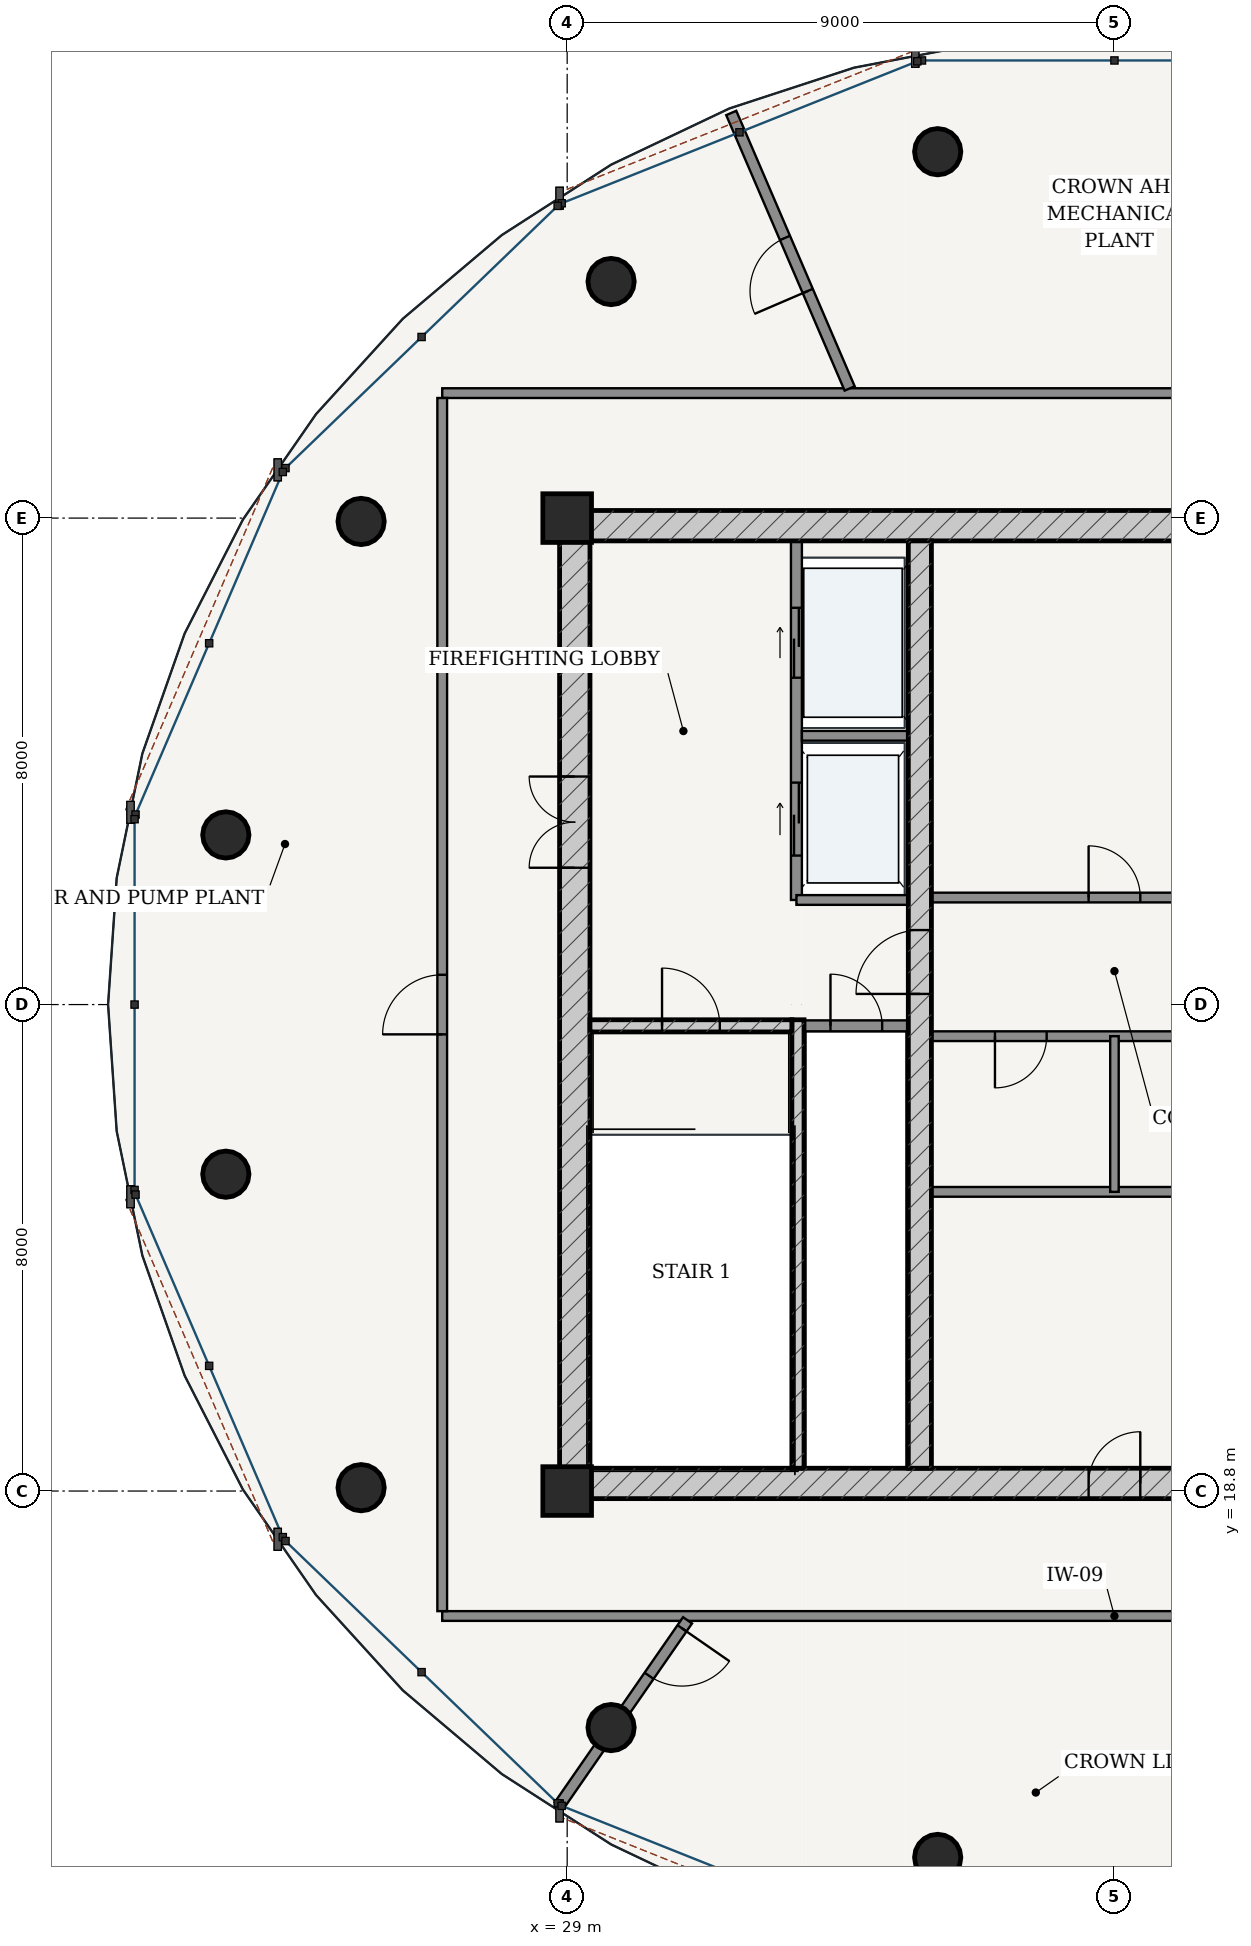
"""IFC4 building model, lengths in metres.
Left out: names, types, materials, properties, quantities, classifications, styles, units other than length and angle.
Written with IfcOpenShell. Run it as: python <this file> out.ifc"""

import sys

from ifc_helpers import new_model, si_unit, direction, frame, frame_2d, origin, origin_2d, place, context, subcontext, project, spatial, rectangle, hollow_circle, extrude, source, transform, mapped, element, fill, save


model = new_model("IFC4")
c1 = context("Model", 3, precision=1e-05, world=origin(), true_north=direction((-0.2419218956, 0.970295726276)))
c2 = subcontext(c1, "Body", "Model", "MODEL_VIEW")
j1 = project(units=[si_unit("LENGTHUNIT", "METRE"), si_unit("PLANEANGLEUNIT", "RADIAN")], contexts=[c1])
p1 = place(None, origin())
s1 = spatial("IfcSite", under=j1, at=p1, CompositionType="ELEMENT")
p2 = place(p1, origin())
s2 = spatial("IfcBuilding", under=s1, at=p2, CompositionType="ELEMENT")
p3 = place(p2, frame((0.0, 0.0, 332.1)))
s3 = spatial("IfcBuildingStorey", under=s2, at=p3, CompositionType="ELEMENT", Elevation=332.1)
for number, where, z_axis, x_axis in (
    (1, (29.0, 18.8, 0.0), (0.0, 0.0, 1.0), (1.0, 0.0, 0.0)),
    (2, (29.0, 34.8, 0.0), (0.0, 0.0, 1.0), (1.0, 0.0, 0.0)),
):
    element("IfcColumn", number, at=place(p3, frame(where, z_axis=z_axis, x_axis=x_axis)), inside=s3, PredefinedType="COLUMN", context=c2, shape_type="SweptSolid", body=[
        extrude(rectangle(XDim=0.8, YDim=0.8, at=origin_2d()), origin(), (0.0, 0.0, 1.0), 5.2),
    ])
p4 = place(p3, frame((28.875, 18.925, 0.0), z_axis=(0.0, 0.0, 1.0), x_axis=(1.0, 0.0, 0.0)))
e3 = element("IfcWall", 3, at=p4, inside=s3, PredefinedType="SHEAR", context=c2, shape_type="SweptSolid", body=[
    extrude(rectangle(XDim=18.25, YDim=0.5, at=frame_2d((9.125, 0.0))), origin(), (0.0, 0.0, 1.0), 4.85),
])
p5 = place(p4, frame((8.7, 0.0, 0.0)))
e4 = element("IfcOpeningElement", 4, at=p5, cuts=e3, PredefinedType="OPENING", context=c2, shape_type="SweptSolid", body=[
    extrude(rectangle(XDim=0.85, YDim=2.1, at=frame_2d((0.425, 1.05))), frame((0.0, 0.26, 0.0), z_axis=(0.0, -1.0, 0.0), x_axis=(1.0, 0.0, 0.0)), (0.0, 0.0, 1.0), 0.52),
])
p6 = place(p3, frame((28.875, 34.675, 0.0), z_axis=(0.0, 0.0, 1.0), x_axis=(1.0, 0.0, 0.0)))
e5 = element("IfcWall", 5, at=p6, inside=s3, PredefinedType="SHEAR", context=c2, shape_type="SweptSolid", body=[
    extrude(rectangle(XDim=18.25, YDim=0.5, at=frame_2d((9.125, 0.0))), origin(), (0.0, 0.0, 1.0), 4.85),
])
p7 = place(p3, frame((29.125, 19.175, 0.0), z_axis=(0.0, 0.0, 1.0), x_axis=(0.0, 1.0, 0.0)))
e6 = element("IfcWall", 6, at=p7, inside=s3, PredefinedType="SHEAR", context=c2, shape_type="SweptSolid", body=[
    extrude(rectangle(XDim=15.25, YDim=0.5, at=frame_2d((7.625, 0.0))), origin(), (0.0, 0.0, 1.0), 4.85),
])
p8 = place(p7, frame((9.875, 0.0, 0.0)))
e7 = element("IfcOpeningElement", 7, at=p8, cuts=e6, PredefinedType="OPENING", context=c2, shape_type="SweptSolid", body=[
    extrude(rectangle(XDim=1.5, YDim=2.2, at=frame_2d((0.75, 1.1))), frame((0.0, 0.26, 0.0), z_axis=(0.0, -1.0, 0.0), x_axis=(1.0, 0.0, 0.0)), (0.0, 0.0, 1.0), 0.52),
])
p9 = place(p3, frame((32.795, 19.175, 0.0), z_axis=(0.0, 0.0, 1.0), x_axis=(0.0, 1.0, 0.0)))
e8 = element("IfcWall", 8, at=p9, inside=s3, PredefinedType="SOLIDWALL", context=c2, shape_type="SweptSolid", body=[
    extrude(rectangle(XDim=7.375, YDim=0.2, at=frame_2d((3.688, 0.0))), origin(), (0.0, 0.0, 1.0), 4.85),
])
p10 = place(p3, frame((29.375, 26.45, 0.0), z_axis=(0.0, 0.0, 1.0), x_axis=(1.0, 0.0, 0.0)))
e9 = element("IfcWall", 9, at=p10, inside=s3, PredefinedType="SOLIDWALL", context=c2, shape_type="SweptSolid", body=[
    extrude(rectangle(XDim=3.32, YDim=0.2, at=frame_2d((1.66, 0.0))), origin(), (0.0, 0.0, 1.0), 4.85),
])
p11 = place(p10, frame((1.185, 0.0, 0.0)))
e10 = element("IfcOpeningElement", 10, at=p11, cuts=e9, PredefinedType="OPENING", context=c2, shape_type="SweptSolid", body=[
    extrude(rectangle(XDim=0.95, YDim=2.15, at=frame_2d((0.475, 1.075))), frame((0.0, 0.11, 0.0), z_axis=(0.0, -1.0, 0.0), x_axis=(1.0, 0.0, 0.0)), (0.0, 0.0, 1.0), 0.22),
])
p12 = place(p3, frame((34.8, 19.175, 0.0), z_axis=(0.0, 0.0, 1.0), x_axis=(0.0, 1.0, 0.0)))
e11 = element("IfcWall", 11, at=p12, inside=s3, PredefinedType="SHEAR", context=c2, shape_type="SweptSolid", body=[
    extrude(rectangle(XDim=15.25, YDim=0.38, at=frame_2d((7.625, 0.0))), origin(), (0.0, 0.0, 1.0), 4.85),
])
p13 = place(p12, frame((7.8, 0.0, 0.0)))
e12 = element("IfcOpeningElement", 12, at=p13, cuts=e11, PredefinedType="OPENING", context=c2, shape_type="SweptSolid", body=[
    extrude(rectangle(XDim=1.05, YDim=2.15, at=frame_2d((0.525, 1.075))), frame((0.0, 0.2, 0.0), z_axis=(0.0, -1.0, 0.0), x_axis=(1.0, 0.0, 0.0)), (0.0, 0.0, 1.0), 0.4),
])
for number, where, z_axis, x_axis in (
    (13, (35.093, 40.825, 0.0), (0.0, 0.0, 1.0), (1.0, 0.0, 0.0)),
    (14, (29.722, 38.69, 0.0), (0.0, 0.0, 1.0), (1.0, 0.0, 0.0)),
    (15, (25.611, 34.745, 0.0), (0.0, 0.0, 1.0), (1.0, 0.0, 0.0)),
    (16, (23.386, 29.59, 0.0), (0.0, 0.0, 1.0), (1.0, 0.0, 0.0)),
    (17, (23.386, 24.01, 0.0), (0.0, 0.0, 1.0), (1.0, 0.0, 0.0)),
    (18, (25.611, 18.855, 0.0), (0.0, 0.0, 1.0), (1.0, 0.0, 0.0)),
    (19, (29.722, 14.91, 0.0), (0.0, 0.0, 1.0), (1.0, 0.0, 0.0)),
    (20, (35.093, 12.775, 0.0), (0.0, 0.0, 1.0), (1.0, 0.0, 0.0)),
):
    element("IfcColumn", number, at=place(p3, frame(where, z_axis=z_axis, x_axis=x_axis)), inside=s3, PredefinedType="COLUMN", context=c2, shape_type="SweptSolid", body=[
        extrude(hollow_circle(Radius=0.381, WallThickness=0.028, at=origin_2d()), origin(), (0.0, 0.0, 1.0), 5.2),
    ])
p14 = place(p3, frame((32.9, 26.45, 0.0), z_axis=(0.0, 0.0, 1.0), x_axis=(1.0, 0.0, 0.0)))
e21 = element("IfcWall", 21, at=p14, inside=s3, PredefinedType="PARTITIONING", context=c2, shape_type="SweptSolid", body=[
    extrude(rectangle(XDim=1.71, YDim=0.18, at=frame_2d((0.855, 0.0))), origin(), (0.0, 0.0, 1.0), 4.85),
])
p15 = place(p14, frame((0.43, 0.0, 0.0)))
e22 = element("IfcOpeningElement", 22, at=p15, cuts=e21, PredefinedType="OPENING", context=c2, shape_type="SweptSolid", body=[
    extrude(rectangle(XDim=0.85, YDim=2.1, at=frame_2d((0.425, 1.05))), frame((0.0, 0.1, 0.0), z_axis=(0.0, -1.0, 0.0), x_axis=(1.0, 0.0, 0.0)), (0.0, 0.0, 1.0), 0.2),
])
p16 = place(p3, frame((32.77, 28.52, 0.0), z_axis=(0.0, 0.0, 1.0), x_axis=(0.0, 1.0, 0.0)))
e23 = element("IfcWall", 23, at=p16, inside=s3, PredefinedType="PARTITIONING", context=c2, shape_type="SweptSolid", body=[
    extrude(rectangle(XDim=5.905, YDim=0.18, at=frame_2d((2.953, 0.0))), origin(), (0.0, 0.0, 1.0), 4.85),
])
p17 = place(p16, frame((3.655, 0.0, 0.0)))
e24 = element("IfcOpeningElement", 24, at=p17, cuts=e23, PredefinedType="OPENING", context=c2, shape_type="SweptSolid", body=[
    extrude(rectangle(XDim=1.15, YDim=2.2, at=frame_2d((0.575, 1.1))), frame((0.0, 0.1, 0.0), z_axis=(0.0, -1.0, 0.0), x_axis=(1.0, 0.0, 0.0)), (0.0, 0.0, 1.0), 0.2),
])
p18 = place(p16, frame((0.73, 0.0, 0.0)))
e25 = element("IfcOpeningElement", 25, at=p18, cuts=e23, PredefinedType="OPENING", context=c2, shape_type="SweptSolid", body=[
    extrude(rectangle(XDim=1.2, YDim=2.25, at=frame_2d((0.6, 1.125))), frame((0.0, 0.1, 0.0), z_axis=(0.0, -1.0, 0.0), x_axis=(1.0, 0.0, 0.0)), (0.0, 0.0, 1.0), 0.2),
])
p19 = place(p3, frame((32.86, 31.22, 0.0), z_axis=(0.0, 0.0, 1.0), x_axis=(1.0, 0.0, 0.0)))
e26 = element("IfcWall", 26, at=p19, inside=s3, PredefinedType="PARTITIONING", context=c2, shape_type="SweptSolid", body=[
    extrude(rectangle(XDim=1.75, YDim=0.16, at=frame_2d((0.875, 0.0))), origin(), (0.0, 0.0, 1.0), 4.85),
])
p20 = place(p3, frame((32.77, 28.52, 0.0), z_axis=(0.0, 0.0, 1.0), x_axis=(1.0, 0.0, 0.0)))
e27 = element("IfcWall", 27, at=p20, inside=s3, PredefinedType="PARTITIONING", context=c2, shape_type="SweptSolid", body=[
    extrude(rectangle(XDim=1.84, YDim=0.16, at=frame_2d((0.92, 0.0))), origin(), (0.0, 0.0, 1.0), 4.85),
])
p21 = place(p3, frame((34.99, 28.56, 0.0), z_axis=(0.0, 0.0, 1.0), x_axis=(1.0, 0.0, 0.0)))
e28 = element("IfcWall", 28, at=p21, inside=s3, PredefinedType="PARTITIONING", context=c2, shape_type="SweptSolid", body=[
    extrude(rectangle(XDim=6.02, YDim=0.16, at=frame_2d((3.01, 0.0))), origin(), (0.0, 0.0, 1.0), 4.85),
])
p22 = place(p21, frame((2.585, 0.0, 0.0)))
e29 = element("IfcOpeningElement", 29, at=p22, cuts=e28, PredefinedType="OPENING", context=c2, shape_type="SweptSolid", body=[
    extrude(rectangle(XDim=0.85, YDim=2.1, at=frame_2d((0.425, 1.05))), frame((0.0, 0.09, 0.0), z_axis=(0.0, -1.0, 0.0), x_axis=(1.0, 0.0, 0.0)), (0.0, 0.0, 1.0), 0.18),
])
p23 = place(p3, frame((34.99, 26.28, 0.0), z_axis=(0.0, 0.0, 1.0), x_axis=(1.0, 0.0, 0.0)))
e30 = element("IfcWall", 30, at=p23, inside=s3, PredefinedType="PARTITIONING", context=c2, shape_type="SweptSolid", body=[
    extrude(rectangle(XDim=6.02, YDim=0.16, at=frame_2d((3.01, 0.0))), origin(), (0.0, 0.0, 1.0), 4.85),
])
p24 = place(p23, frame((1.045, 0.0, 0.0)))
e31 = element("IfcOpeningElement", 31, at=p24, cuts=e30, PredefinedType="OPENING", context=c2, shape_type="SweptSolid", body=[
    extrude(rectangle(XDim=0.85, YDim=2.1, at=frame_2d((0.425, 1.05))), frame((0.0, 0.09, 0.0), z_axis=(0.0, -1.0, 0.0), x_axis=(1.0, 0.0, 0.0)), (0.0, 0.0, 1.0), 0.18),
])
p25 = place(p23, frame((4.125, 0.0, 0.0)))
e32 = element("IfcOpeningElement", 32, at=p25, cuts=e30, PredefinedType="OPENING", context=c2, shape_type="SweptSolid", body=[
    extrude(rectangle(XDim=0.85, YDim=2.1, at=frame_2d((0.425, 1.05))), frame((0.0, 0.09, 0.0), z_axis=(0.0, -1.0, 0.0), x_axis=(1.0, 0.0, 0.0)), (0.0, 0.0, 1.0), 0.18),
])
p26 = place(p3, frame((34.99, 23.72, 0.0), z_axis=(0.0, 0.0, 1.0), x_axis=(1.0, 0.0, 0.0)))
e33 = element("IfcWall", 33, at=p26, inside=s3, PredefinedType="PARTITIONING", context=c2, shape_type="SweptSolid", body=[
    extrude(rectangle(XDim=6.02, YDim=0.16, at=frame_2d((3.01, 0.0))), origin(), (0.0, 0.0, 1.0), 4.85),
])
p27 = place(p3, frame((38.0, 23.72, 0.0), z_axis=(0.0, 0.0, 1.0), x_axis=(0.0, 1.0, 0.0)))
e34 = element("IfcWall", 34, at=p27, inside=s3, PredefinedType="PARTITIONING", context=c2, shape_type="SweptSolid", body=[
    extrude(rectangle(XDim=2.56, YDim=0.14, at=frame_2d((1.28, 0.0))), origin(), (0.0, 0.0, 1.0), 4.85),
])
p28 = place(p3, frame((26.945, 16.745, 0.0), z_axis=(0.0, 0.0, 1.0), x_axis=(1.0, 0.0, 0.0)))
e35 = element("IfcWall", 35, at=p28, inside=s3, PredefinedType="PARTITIONING", context=c2, shape_type="SweptSolid", body=[
    extrude(rectangle(XDim=22.11, YDim=0.16, at=frame_2d((11.055, 0.0))), origin(), (0.0, 0.0, 1.0), 4.422),
])
p29 = place(p28, frame((12.424, 0.0, 0.0)))
e36 = element("IfcOpeningElement", 36, at=p29, cuts=e35, PredefinedType="OPENING", context=c2, shape_type="SweptSolid", body=[
    extrude(rectangle(XDim=0.98, YDim=2.2, at=frame_2d((0.49, 1.1))), frame((0.0, 0.09, 0.0), z_axis=(0.0, -1.0, 0.0), x_axis=(1.0, 0.0, 0.0)), (0.0, 0.0, 1.0), 0.18),
])
p30 = place(p3, frame((26.945, 36.855, 0.0), z_axis=(0.0, 0.0, 1.0), x_axis=(1.0, 0.0, 0.0)))
e37 = element("IfcWall", 37, at=p30, inside=s3, PredefinedType="PARTITIONING", context=c2, shape_type="SweptSolid", body=[
    extrude(rectangle(XDim=22.11, YDim=0.16, at=frame_2d((11.055, 0.0))), origin(), (0.0, 0.0, 1.0), 4.422),
])
p31 = place(p30, frame((13.768, 0.0, 0.0)))
e38 = element("IfcOpeningElement", 38, at=p31, cuts=e37, PredefinedType="OPENING", context=c2, shape_type="SweptSolid", body=[
    extrude(rectangle(XDim=0.98, YDim=2.2, at=frame_2d((0.49, 1.1))), frame((0.0, 0.09, 0.0), z_axis=(0.0, -1.0, 0.0), x_axis=(1.0, 0.0, 0.0)), (0.0, 0.0, 1.0), 0.18),
])
p32 = place(p3, frame((26.945, 16.825, 0.0), z_axis=(0.0, 0.0, 1.0), x_axis=(0.0, 1.0, 0.0)))
e39 = element("IfcWall", 39, at=p32, inside=s3, PredefinedType="PARTITIONING", context=c2, shape_type="SweptSolid", body=[
    extrude(rectangle(XDim=19.95, YDim=0.16, at=frame_2d((9.975, 0.0))), origin(), (0.0, 0.0, 1.0), 4.422),
])
p33 = place(p32, frame((9.485, 0.0, 0.0)))
e40 = element("IfcOpeningElement", 40, at=p33, cuts=e39, PredefinedType="OPENING", context=c2, shape_type="SweptSolid", body=[
    extrude(rectangle(XDim=0.98, YDim=2.2, at=frame_2d((0.49, 1.1))), frame((0.0, 0.09, 0.0), z_axis=(0.0, -1.0, 0.0), x_axis=(1.0, 0.0, 0.0)), (0.0, 0.0, 1.0), 0.18),
])
p34 = place(p3, frame((33.645, 36.932, 0.0), z_axis=(0.0, 0.0, 1.0), x_axis=(-0.394839297391, 0.918750199584, 0.0)))
e41 = element("IfcWall", 41, at=p34, inside=s3, PredefinedType="PARTITIONING", context=c2, shape_type="SweptSolid", body=[
    extrude(rectangle(XDim=4.931, YDim=0.18, at=frame_2d((2.466, 0.0))), origin(), (0.0, 0.0, 1.0), 4.481),
])
p35 = place(p34, frame((1.744, 0.0, 0.0)))
e42 = element("IfcOpeningElement", 42, at=p35, cuts=e41, PredefinedType="OPENING", context=c2, shape_type="SweptSolid", body=[
    extrude(rectangle(XDim=0.95, YDim=2.15, at=frame_2d((0.475, 1.075))), frame((0.0, 0.1, 0.0), z_axis=(0.0, -1.0, 0.0), x_axis=(1.0, 0.0, 0.0)), (0.0, 0.0, 1.0), 0.2),
])
p36 = place(p3, frame((30.979, 16.674, 0.0), z_axis=(0.0, 0.0, 1.0), x_axis=(-0.569738046405, -0.82182635543, 0.0)))
e43 = element("IfcWall", 43, at=p36, inside=s3, PredefinedType="PARTITIONING", context=c2, shape_type="SweptSolid", body=[
    extrude(rectangle(XDim=3.701, YDim=0.18, at=frame_2d((1.851, 0.0))), origin(), (0.0, 0.0, 1.0), 4.422),
])
p37 = place(p36, frame((0.16, 0.0, 0.0)))
e44 = element("IfcOpeningElement", 44, at=p37, cuts=e43, PredefinedType="OPENING", context=c2, shape_type="SweptSolid", body=[
    extrude(rectangle(XDim=0.95, YDim=2.15, at=frame_2d((0.475, 1.075))), frame((0.0, 0.1, 0.0), z_axis=(0.0, -1.0, 0.0), x_axis=(1.0, 0.0, 0.0)), (0.0, 0.0, 1.0), 0.2),
])
m1 = source(origin(), c2, "Body", "SweptSolid", [
    extrude(rectangle(XDim=1.5, YDim=2.2, at=frame_2d((0.75, 1.1))), frame((0.0, 0.025, 0.0), z_axis=(0.0, -1.0, 0.0), x_axis=(1.0, 0.0, 0.0)), (0.0, 0.0, 1.0), 0.05),
])
p38 = place(p8, origin())
e45 = element("IfcDoor", 45, at=p38, inside=s3, OperationType="DOUBLE_DOOR_SINGLE_SWING", PredefinedType="DOOR", context=c2, shape_type="MappedRepresentation", body=[
    mapped(m1, transform((0.0, 0.0, 0.0), scale=1.0)),
])
fill(e7, e45)
m2 = source(origin(), c2, "Body", "SweptSolid", [
    extrude(rectangle(XDim=1.05, YDim=2.15, at=frame_2d((0.525, 1.075))), frame((0.0, 0.025, 0.0), z_axis=(0.0, -1.0, 0.0), x_axis=(1.0, 0.0, 0.0)), (0.0, 0.0, 1.0), 0.05),
])
p39 = place(p13, origin())
e46 = element("IfcDoor", 46, at=p39, inside=s3, OperationType="SINGLE_SWING_LEFT", PredefinedType="DOOR", context=c2, shape_type="MappedRepresentation", body=[
    mapped(m2, transform((0.0, 0.0, 0.0), scale=1.0)),
])
fill(e12, e46)
m3 = source(origin(), c2, "Body", "SweptSolid", [
    extrude(rectangle(XDim=0.95, YDim=2.15, at=frame_2d((0.475, 1.075))), frame((0.0, 0.025, 0.0), z_axis=(0.0, -1.0, 0.0), x_axis=(1.0, 0.0, 0.0)), (0.0, 0.0, 1.0), 0.05),
])
p40 = place(p11, origin())
e47 = element("IfcDoor", 47, at=p40, inside=s3, OperationType="SINGLE_SWING_LEFT", PredefinedType="DOOR", context=c2, shape_type="MappedRepresentation", body=[
    mapped(m3, transform((0.0, 0.0, 0.0), scale=1.0)),
])
fill(e10, e47)
m4 = source(origin(), c2, "Body", "SweptSolid", [
    extrude(rectangle(XDim=0.85, YDim=2.1, at=frame_2d((0.425, 1.05))), frame((0.0, 0.025, 0.0), z_axis=(0.0, -1.0, 0.0), x_axis=(1.0, 0.0, 0.0)), (0.0, 0.0, 1.0), 0.05),
])
p41 = place(p15, origin())
e48 = element("IfcDoor", 48, at=p41, inside=s3, OperationType="SINGLE_SWING_LEFT", PredefinedType="DOOR", context=c2, shape_type="MappedRepresentation", body=[
    mapped(m4, transform((0.0, 0.0, 0.0), scale=1.0)),
])
fill(e22, e48)
p42 = place(p22, origin())
e49 = element("IfcDoor", 49, at=p42, inside=s3, OperationType="SINGLE_SWING_LEFT", PredefinedType="DOOR", context=c2, shape_type="MappedRepresentation", body=[
    mapped(m4, transform((0.0, 0.0, 0.0), scale=1.0)),
])
fill(e29, e49)
p43 = place(p24, frame((0.85, 0.0, 0.0), z_axis=(0.0, 0.0, 1.0), x_axis=(-1.0, 0.0, 0.0)))
e50 = element("IfcDoor", 50, at=p43, inside=s3, OperationType="SINGLE_SWING_RIGHT", PredefinedType="DOOR", context=c2, shape_type="MappedRepresentation", body=[
    mapped(m4, transform((0.0, 0.0, 0.0), scale=1.0)),
])
fill(e31, e50)
p44 = place(p5, origin())
e51 = element("IfcDoor", 51, at=p44, inside=s3, OperationType="SINGLE_SWING_RIGHT", PredefinedType="DOOR", context=c2, shape_type="MappedRepresentation", body=[
    mapped(m4, transform((0.0, 0.0, 0.0), scale=1.0)),
])
fill(e4, e51)
m5 = source(origin(), c2, "Body", "SweptSolid", [
    extrude(rectangle(XDim=1.15, YDim=2.2, at=frame_2d((0.575, 1.1))), frame((0.0, 0.025, 0.0), z_axis=(0.0, -1.0, 0.0), x_axis=(1.0, 0.0, 0.0)), (0.0, 0.0, 1.0), 0.05),
])
p45 = place(p17, origin())
e52 = element("IfcDoor", 52, at=p45, inside=s3, OperationType="DOUBLE_DOOR_SLIDING", PredefinedType="DOOR", context=c2, shape_type="MappedRepresentation", body=[
    mapped(m5, transform((0.0, 0.0, 0.0), scale=1.0)),
])
fill(e24, e52)
m6 = source(origin(), c2, "Body", "SweptSolid", [
    extrude(rectangle(XDim=1.2, YDim=2.25, at=frame_2d((0.6, 1.125))), frame((0.0, 0.025, 0.0), z_axis=(0.0, -1.0, 0.0), x_axis=(1.0, 0.0, 0.0)), (0.0, 0.0, 1.0), 0.05),
])
p46 = place(p18, origin())
e53 = element("IfcDoor", 53, at=p46, inside=s3, OperationType="DOUBLE_DOOR_SLIDING", PredefinedType="DOOR", context=c2, shape_type="MappedRepresentation", body=[
    mapped(m6, transform((0.0, 0.0, 0.0), scale=1.0)),
])
fill(e25, e53)
m7 = source(origin(), c2, "Body", "SweptSolid", [
    extrude(rectangle(XDim=0.98, YDim=2.2, at=frame_2d((0.49, 1.1))), frame((0.0, 0.025, 0.0), z_axis=(0.0, -1.0, 0.0), x_axis=(1.0, 0.0, 0.0)), (0.0, 0.0, 1.0), 0.05),
])
p47 = place(p33, origin())
e54 = element("IfcDoor", 54, at=p47, inside=s3, OperationType="SINGLE_SWING_LEFT", PredefinedType="DOOR", context=c2, shape_type="MappedRepresentation", body=[
    mapped(m7, transform((0.0, 0.0, 0.0), scale=1.0)),
])
fill(e40, e54)
p48 = place(p35, origin())
e55 = element("IfcDoor", 55, at=p48, inside=s3, OperationType="SINGLE_SWING_LEFT", PredefinedType="DOOR", context=c2, shape_type="MappedRepresentation", body=[
    mapped(m3, transform((0.0, 0.0, 0.0), scale=1.0)),
])
fill(e42, e55)
p49 = place(p37, origin())
e56 = element("IfcDoor", 56, at=p49, inside=s3, OperationType="SINGLE_SWING_LEFT", PredefinedType="DOOR", context=c2, shape_type="MappedRepresentation", body=[
    mapped(m3, transform((0.0, 0.0, 0.0), scale=1.0)),
])
fill(e44, e56)
save(model, sys.argv[1])
